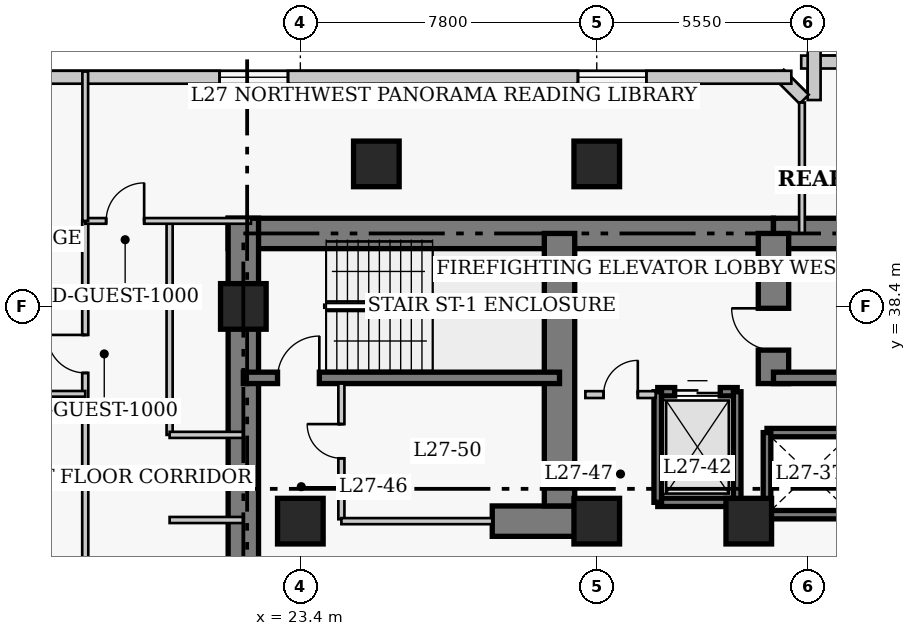
"""IFC4 building model, lengths in metres.
Left out: names, types, materials, properties, quantities, classifications, styles, units other than length and angle.
Written with IfcOpenShell. Run it as: python <this file> out.ifc"""

import sys

from ifc_helpers import new_model, si_unit, direction, frame, frame_2d, origin, origin_2d, place, context, subcontext, project, spatial, rectangle, extrude, element, fill, save


model = new_model("IFC4")
c1 = context("Model", 3, precision=1e-05, world=origin(), true_north=direction((0.0, 1.0)))
c2 = subcontext(c1, "Body", "Model", "MODEL_VIEW")
j1 = project(units=[si_unit("LENGTHUNIT", "METRE"), si_unit("PLANEANGLEUNIT", "RADIAN")], contexts=[c1])
p1 = place(None, origin())
s1 = spatial("IfcSite", under=j1, at=p1, CompositionType="ELEMENT")
p2 = place(p1, origin())
s2 = spatial("IfcBuilding", under=s1, at=p2, CompositionType="ELEMENT")
p3 = place(p2, frame((0.0, 0.0, 110.8)))
s3 = spatial("IfcBuildingStorey", under=s2, at=p3, CompositionType="ELEMENT", Elevation=110.8)
p4 = place(p3, frame((21.5, 40.32, 0.0), z_axis=(0.0, 0.0, 1.0), x_axis=(1.0, 0.0, 0.0)))
e1 = element("IfcWall", 1, at=p4, inside=s3, PredefinedType="SHEAR", context=c2, shape_type="SweptSolid", body=[
    extrude(rectangle(XDim=14.35, YDim=0.8, at=frame_2d((7.175, 0.0))), origin(), (0.0, 0.0, 1.0), 3.8),
])
p5 = place(p3, frame((35.85, 40.32, 0.0), z_axis=(0.0, 0.0, 1.0), x_axis=(1.0, 0.0, 0.0)))
e2 = element("IfcWall", 2, at=p5, inside=s3, PredefinedType="SHEAR", context=c2, shape_type="SweptSolid", body=[
    extrude(rectangle(XDim=12.6, YDim=0.8, at=frame_2d((6.3, 0.0))), origin(), (0.0, 0.0, 1.0), 3.8),
])
p6 = place(p3, frame((21.9, 27.05, 0.0), z_axis=(0.0, 0.0, 1.0), x_axis=(0.0, 1.0, 0.0)))
e3 = element("IfcWall", 3, at=p6, inside=s3, PredefinedType="SHEAR", context=c2, shape_type="SweptSolid", body=[
    extrude(rectangle(XDim=13.67, YDim=0.8, at=frame_2d((6.835, 0.0))), origin(), (0.0, 0.0, 1.0), 3.8),
])
p7 = place(p3, frame((28.45, 32.75, 0.0), z_axis=(0.0, 0.0, 1.0), x_axis=(1.0, 0.0, 0.0)))
e4 = element("IfcWall", 4, at=p7, inside=s3, PredefinedType="SHEAR", context=c2, shape_type="SweptSolid", body=[
    extrude(rectangle(XDim=2.4, YDim=0.8, at=frame_2d((1.2, 0.0))), origin(), (0.0, 0.0, 1.0), 3.8),
])
p8 = place(p3, frame((30.22, 33.15, 0.0), z_axis=(0.0, 0.0, 1.0), x_axis=(0.0, 1.0, 0.0)))
e5 = element("IfcWall", 5, at=p8, inside=s3, PredefinedType="SHEAR", context=c2, shape_type="SweptSolid", body=[
    extrude(rectangle(XDim=7.17, YDim=0.8, at=frame_2d((3.585, 0.0))), origin(), (0.0, 0.0, 1.0), 3.8),
])
p9 = place(p3, frame((35.85, 36.37, 0.0), z_axis=(0.0, 0.0, 1.0), x_axis=(0.0, 1.0, 0.0)))
e6 = element("IfcWall", 6, at=p9, inside=s3, PredefinedType="SHEAR", context=c2, shape_type="SweptSolid", body=[
    extrude(rectangle(XDim=3.95, YDim=0.8, at=frame_2d((1.975, 0.0))), origin(), (0.0, 0.0, 1.0), 3.8),
])
p10 = place(p9, frame((0.88, 0.0, 0.0)))
e7 = element("IfcOpeningElement", 7, at=p10, cuts=e6, PredefinedType="OPENING", context=c2, shape_type="SweptSolid", body=[
    extrude(rectangle(XDim=1.1, YDim=2.15, at=frame_2d((0.55, 1.075))), frame((0.0, 0.41, 0.0), z_axis=(0.0, -1.0, 0.0), x_axis=(1.0, 0.0, 0.0)), (0.0, 0.0, 1.0), 0.82),
])
p11 = place(p3, frame((21.9, 36.52, 0.0), z_axis=(0.0, 0.0, 1.0), x_axis=(1.0, 0.0, 0.0)))
e8 = element("IfcWall", 8, at=p11, inside=s3, PredefinedType="SHEAR", context=c2, shape_type="SweptSolid", body=[
    extrude(rectangle(XDim=8.32, YDim=0.3, at=frame_2d((4.16, 0.0))), origin(), (0.0, 0.0, 1.0), 3.8),
])
p12 = place(p11, frame((0.9, 0.0, 0.0)))
e9 = element("IfcOpeningElement", 9, at=p12, cuts=e8, PredefinedType="OPENING", context=c2, shape_type="SweptSolid", body=[
    extrude(rectangle(XDim=1.1, YDim=2.15, at=frame_2d((0.55, 1.075))), frame((0.0, 0.16, 0.0), z_axis=(0.0, -1.0, 0.0), x_axis=(1.0, 0.0, 0.0)), (0.0, 0.0, 1.0), 0.32),
])
p13 = place(p3, frame((35.85, 36.52, 0.0), z_axis=(0.0, 0.0, 1.0), x_axis=(1.0, 0.0, 0.0)))
e10 = element("IfcWall", 10, at=p13, inside=s3, PredefinedType="SHEAR", context=c2, shape_type="SweptSolid", body=[
    extrude(rectangle(XDim=8.33, YDim=0.3, at=frame_2d((4.165, 0.0))), origin(), (0.0, 0.0, 1.0), 3.8),
])
for number, where, z_axis, x_axis in (
    (11, (21.9, 38.4, 0.0), (0.0, 0.0, 1.0), (1.0, 0.0, 0.0)),
    (12, (23.4, 32.75, 0.0), (0.0, 0.0, 1.0), (1.0, 0.0, 0.0)),
    (13, (31.2, 32.75, 0.0), (0.0, 0.0, 1.0), (1.0, 0.0, 0.0)),
    (14, (35.2, 32.75, 0.0), (0.0, 0.0, 1.0), (1.0, 0.0, 0.0)),
    (15, (25.4, 42.15, 0.0), (0.0, 0.0, 1.0), (1.0, 0.0, 0.0)),
    (16, (31.2, 42.15, 0.0), (0.0, 0.0, 1.0), (1.0, 0.0, 0.0)),
):
    element("IfcColumn", number, at=place(p3, frame(where, z_axis=z_axis, x_axis=x_axis)), inside=s3, PredefinedType="COLUMN", context=c2, shape_type="SweptSolid", body=[
        extrude(rectangle(XDim=1.2, YDim=1.2, at=origin_2d()), origin(), (0.0, 0.0, 1.0), 3.8),
    ])
p14 = place(p3, frame((41.42, 44.83, 0.0), z_axis=(0.0, 0.0, 1.0), x_axis=(-1.0, 0.0, 0.0)))
e17 = element("IfcWall", 17, at=p14, inside=s3, PredefinedType="SOLIDWALL", context=c2, shape_type="SweptSolid", body=[
    extrude(rectangle(XDim=4.84, YDim=0.34, at=frame_2d((2.42, 0.0))), origin(), (0.0, 0.0, 1.0), 3.54),
])
p15 = place(p14, frame((1.52, 0.0, 0.85)))
e18 = element("IfcOpeningElement", 18, at=p15, cuts=e17, PredefinedType="OPENING", context=c2, shape_type="SweptSolid", body=[
    extrude(rectangle(XDim=1.8, YDim=1.8, at=frame_2d((0.9, 0.9))), frame((0.0, 0.18, 0.0), z_axis=(0.0, -1.0, 0.0), x_axis=(1.0, 0.0, 0.0)), (0.0, 0.0, 1.0), 0.36),
])
p16 = place(p3, frame((36.92, 45.17, 0.0), z_axis=(0.0, 0.0, 1.0), x_axis=(0.0, -1.0, 0.0)))
e19 = element("IfcWall", 19, at=p16, inside=s3, PredefinedType="SOLIDWALL", context=c2, shape_type="SweptSolid", body=[
    extrude(rectangle(XDim=1.34, YDim=0.34, at=frame_2d((0.67, 0.0))), origin(), (0.0, 0.0, 1.0), 3.54),
])
p17 = place(p3, frame((36.658, 43.852, 0.0), z_axis=(0.0, 0.0, 1.0), x_axis=(-0.707238225886, 0.706975312048, 0.0)))
e20 = element("IfcWall", 20, at=p17, inside=s3, PredefinedType="SOLIDWALL", context=c2, shape_type="SweptSolid", body=[
    extrude(rectangle(XDim=0.929, YDim=0.34, at=frame_2d((0.464, 0.0))), origin(), (0.0, 0.0, 1.0), 3.54),
])
p18 = place(p3, frame((36.32, 44.43, 0.0), z_axis=(0.0, 0.0, 1.0), x_axis=(-1.0, 0.0, 0.0)))
e21 = element("IfcWall", 21, at=p18, inside=s3, PredefinedType="SOLIDWALL", context=c2, shape_type="SweptSolid", body=[
    extrude(rectangle(XDim=28.29, YDim=0.34, at=frame_2d((14.145, 0.0))), origin(), (0.0, 0.0, 1.0), 3.54),
])
p19 = place(p18, frame((3.815, 0.0, 0.85)))
e22 = element("IfcOpeningElement", 22, at=p19, cuts=e21, PredefinedType="OPENING", context=c2, shape_type="SweptSolid", body=[
    extrude(rectangle(XDim=1.8, YDim=1.8, at=frame_2d((0.9, 0.9))), frame((0.0, 0.18, 0.0), z_axis=(0.0, -1.0, 0.0), x_axis=(1.0, 0.0, 0.0)), (0.0, 0.0, 1.0), 0.36),
])
p20 = place(p18, frame((13.245, 0.0, 0.85)))
e23 = element("IfcOpeningElement", 23, at=p20, cuts=e21, PredefinedType="OPENING", context=c2, shape_type="SweptSolid", body=[
    extrude(rectangle(XDim=1.8, YDim=1.8, at=frame_2d((0.9, 0.9))), frame((0.0, 0.18, 0.0), z_axis=(0.0, -1.0, 0.0), x_axis=(1.0, 0.0, 0.0)), (0.0, 0.0, 1.0), 0.36),
])
p21 = place(p18, frame((22.675, 0.0, 0.85)))
e24 = element("IfcOpeningElement", 24, at=p21, cuts=e21, PredefinedType="OPENING", context=c2, shape_type="SweptSolid", body=[
    extrude(rectangle(XDim=1.8, YDim=1.8, at=frame_2d((0.9, 0.9))), frame((0.0, 0.18, 0.0), z_axis=(0.0, -1.0, 0.0), x_axis=(1.0, 0.0, 0.0)), (0.0, 0.0, 1.0), 0.36),
])
for number, where, z_axis, x_axis in (
    (25, (35.68, 35.08, 0.0), (0.0, 0.0, 1.0), (1.0, 0.0, 0.0)),
    (26, (35.68, 32.92, 0.0), (0.0, 0.0, 1.0), (1.0, 0.0, 0.0)),
):
    element("IfcWall", number, at=place(p3, frame(where, z_axis=z_axis, x_axis=x_axis)), inside=s3, PredefinedType="SHEAR", context=c2, shape_type="SweptSolid", body=[
        extrude(rectangle(XDim=2.32, YDim=0.22, at=frame_2d((1.16, 0.0))), origin(), (0.0, 0.0, 1.0), 3.8),
    ])
p22 = place(p3, frame((35.68, 32.92, 0.0), z_axis=(0.0, 0.0, 1.0), x_axis=(0.0, 1.0, 0.0)))
e27 = element("IfcWall", 27, at=p22, inside=s3, PredefinedType="SHEAR", context=c2, shape_type="SweptSolid", body=[
    extrude(rectangle(XDim=2.16, YDim=0.2, at=frame_2d((1.08, 0.0))), origin(), (0.0, 0.0, 1.0), 3.8),
])
p23 = place(p3, frame((32.805, 36.155, 0.0), z_axis=(0.0, 0.0, 1.0), x_axis=(1.0, 0.0, 0.0)))
e28 = element("IfcWall", 28, at=p23, inside=s3, PredefinedType="SHEAR", context=c2, shape_type="SweptSolid", body=[
    extrude(rectangle(XDim=2.09, YDim=0.22, at=frame_2d((1.045, 0.0))), origin(), (0.0, 0.0, 1.0), 3.8),
])
p24 = place(p23, frame((0.445, 0.0, 0.0)))
e29 = element("IfcOpeningElement", 29, at=p24, cuts=e28, PredefinedType="OPENING", context=c2, shape_type="SweptSolid", body=[
    extrude(rectangle(XDim=1.2, YDim=2.15, at=frame_2d((0.6, 1.075))), frame((0.0, 0.12, 0.0), z_axis=(0.0, -1.0, 0.0), x_axis=(1.0, 0.0, 0.0)), (0.0, 0.0, 1.0), 0.24),
])
p25 = place(p3, frame((32.805, 33.245, 0.0), z_axis=(0.0, 0.0, 1.0), x_axis=(1.0, 0.0, 0.0)))
e30 = element("IfcWall", 30, at=p25, inside=s3, PredefinedType="SHEAR", context=c2, shape_type="SweptSolid", body=[
    extrude(rectangle(XDim=2.09, YDim=0.22, at=frame_2d((1.045, 0.0))), origin(), (0.0, 0.0, 1.0), 3.8),
])
for number, where, z_axis, x_axis in (
    (31, (32.805, 33.245, 0.0), (0.0, 0.0, 1.0), (0.0, 1.0, 0.0)),
    (32, (34.895, 33.245, 0.0), (0.0, 0.0, 1.0), (0.0, 1.0, 0.0)),
):
    element("IfcWall", number, at=place(p3, frame(where, z_axis=z_axis, x_axis=x_axis)), inside=s3, PredefinedType="SHEAR", context=c2, shape_type="SweptSolid", body=[
        extrude(rectangle(XDim=2.91, YDim=0.2, at=frame_2d((1.455, 0.0))), origin(), (0.0, 0.0, 1.0), 3.8),
    ])
p26 = place(p3, frame((30.9, 36.08, 0.0), z_axis=(0.0, 0.0, 1.0), x_axis=(1.0, 0.0, 0.0)))
e33 = element("IfcWall", 33, at=p26, inside=s3, PredefinedType="PARTITIONING", context=c2, shape_type="SweptSolid", body=[
    extrude(rectangle(XDim=1.85, YDim=0.18, at=frame_2d((0.925, 0.0))), origin(), (0.0, 0.0, 1.0), 3.54),
])
p27 = place(p26, frame((0.48, 0.0, 0.0)))
e34 = element("IfcOpeningElement", 34, at=p27, cuts=e33, PredefinedType="OPENING", context=c2, shape_type="SweptSolid", body=[
    extrude(rectangle(XDim=0.9, YDim=2.15, at=frame_2d((0.45, 1.075))), frame((0.0, 0.1, 0.0), z_axis=(0.0, -1.0, 0.0), x_axis=(1.0, 0.0, 0.0)), (0.0, 0.0, 1.0), 0.2),
])
p28 = place(p3, frame((24.48, 32.8, 0.0), z_axis=(0.0, 0.0, 1.0), x_axis=(0.0, 1.0, 0.0)))
e35 = element("IfcWall", 35, at=p28, inside=s3, PredefinedType="PARTITIONING", context=c2, shape_type="SweptSolid", body=[
    extrude(rectangle(XDim=3.57, YDim=0.16, at=frame_2d((1.785, 0.0))), origin(), (0.0, 0.0, 1.0), 3.54),
])
p29 = place(p28, frame((1.604, 0.0, 0.0)))
e36 = element("IfcOpeningElement", 36, at=p29, cuts=e35, PredefinedType="OPENING", context=c2, shape_type="SweptSolid", body=[
    extrude(rectangle(XDim=0.9, YDim=2.1, at=frame_2d((0.45, 1.05))), frame((0.0, 0.09, 0.0), z_axis=(0.0, -1.0, 0.0), x_axis=(1.0, 0.0, 0.0)), (0.0, 0.0, 1.0), 0.18),
])
p30 = place(p3, frame((24.48, 32.75, 0.0), z_axis=(0.0, 0.0, 1.0), x_axis=(1.0, 0.0, 0.0)))
e37 = element("IfcWall", 37, at=p30, inside=s3, PredefinedType="PARTITIONING", context=c2, shape_type="SweptSolid", body=[
    extrude(rectangle(XDim=3.97, YDim=0.16, at=frame_2d((1.985, 0.0))), origin(), (0.0, 0.0, 1.0), 3.54),
])
p31 = place(p3, frame((17.74, 6.65, 0.0), z_axis=(0.0, 0.0, 1.0), x_axis=(0.0, 1.0, 0.0)))
e38 = element("IfcWall", 38, at=p31, inside=s3, PredefinedType="PARTITIONING", context=c2, shape_type="SweptSolid", body=[
    extrude(rectangle(XDim=34.0, YDim=0.16, at=frame_2d((17.0, 0.0))), origin(), (0.0, 0.0, 1.0), 3.54),
])
p32 = place(p31, frame((1.8, 0.0, 0.0)))
e39 = element("IfcOpeningElement", 39, at=p32, cuts=e38, PredefinedType="OPENING", context=c2, shape_type="SweptSolid", body=[
    extrude(rectangle(XDim=0.95, YDim=2.1, at=frame_2d((0.475, 1.05))), frame((0.0, 0.09, 0.0), z_axis=(0.0, -1.0, 0.0), x_axis=(1.0, 0.0, 0.0)), (0.0, 0.0, 1.0), 0.18),
])
p33 = place(p31, frame((8.475, 0.0, 0.0)))
e40 = element("IfcOpeningElement", 40, at=p33, cuts=e38, PredefinedType="OPENING", context=c2, shape_type="SweptSolid", body=[
    extrude(rectangle(XDim=0.95, YDim=2.1, at=frame_2d((0.475, 1.05))), frame((0.0, 0.09, 0.0), z_axis=(0.0, -1.0, 0.0), x_axis=(1.0, 0.0, 0.0)), (0.0, 0.0, 1.0), 0.18),
])
p34 = place(p31, frame((14.255, 0.0, 0.0)))
e41 = element("IfcOpeningElement", 41, at=p34, cuts=e38, PredefinedType="OPENING", context=c2, shape_type="SweptSolid", body=[
    extrude(rectangle(XDim=0.95, YDim=2.1, at=frame_2d((0.475, 1.05))), frame((0.0, 0.09, 0.0), z_axis=(0.0, -1.0, 0.0), x_axis=(1.0, 0.0, 0.0)), (0.0, 0.0, 1.0), 0.18),
])
p35 = place(p31, frame((30.0, 0.0, 0.0)))
e42 = element("IfcOpeningElement", 42, at=p35, cuts=e38, PredefinedType="OPENING", context=c2, shape_type="SweptSolid", body=[
    extrude(rectangle(XDim=1.0, YDim=2.15, at=frame_2d((0.5, 1.075))), frame((0.0, 0.09, 0.0), z_axis=(0.0, -1.0, 0.0), x_axis=(1.0, 0.0, 0.0)), (0.0, 0.0, 1.0), 0.18),
])
p36 = place(p3, frame((19.96, 35.02, 0.0), z_axis=(0.0, 0.0, 1.0), x_axis=(0.0, 1.0, 0.0)))
e43 = element("IfcWall", 43, at=p36, inside=s3, PredefinedType="PARTITIONING", context=c2, shape_type="SweptSolid", body=[
    extrude(rectangle(XDim=5.63, YDim=0.16, at=frame_2d((2.815, 0.0))), origin(), (0.0, 0.0, 1.0), 3.54),
])
for number, where, z_axis, x_axis in (
    (44, (19.96, 35.02, 0.0), (0.0, 0.0, 1.0), (1.0, 0.0, 0.0)),
    (45, (19.96, 32.78, 0.0), (0.0, 0.0, 1.0), (1.0, 0.0, 0.0)),
):
    element("IfcWall", number, at=place(p3, frame(where, z_axis=z_axis, x_axis=x_axis)), inside=s3, PredefinedType="PARTITIONING", context=c2, shape_type="SweptSolid", body=[
        extrude(rectangle(XDim=1.94, YDim=0.16, at=frame_2d((0.97, 0.0))), origin(), (0.0, 0.0, 1.0), 3.54),
    ])
p37 = place(p3, frame((17.74, 40.65, 0.0), z_axis=(0.0, 0.0, 1.0), x_axis=(1.0, 0.0, 0.0)))
e46 = element("IfcWall", 46, at=p37, inside=s3, PredefinedType="PARTITIONING", context=c2, shape_type="SweptSolid", body=[
    extrude(rectangle(XDim=4.36, YDim=0.15, at=frame_2d((2.18, 0.0))), origin(), (0.0, 0.0, 1.0), 3.54),
])
p38 = place(p37, frame((0.55, 0.0, 0.0)))
e47 = element("IfcOpeningElement", 47, at=p38, cuts=e46, PredefinedType="OPENING", context=c2, shape_type="SweptSolid", body=[
    extrude(rectangle(XDim=1.0, YDim=2.15, at=frame_2d((0.5, 1.075))), frame((0.0, 0.085, 0.0), z_axis=(0.0, -1.0, 0.0), x_axis=(1.0, 0.0, 0.0)), (0.0, 0.0, 1.0), 0.17),
])
p39 = place(p3, frame((17.74, 40.65, 0.0), z_axis=(0.0, 0.0, 1.0), x_axis=(0.0, 1.0, 0.0)))
e48 = element("IfcWall", 48, at=p39, inside=s3, PredefinedType="PARTITIONING", context=c2, shape_type="SweptSolid", body=[
    extrude(rectangle(XDim=3.93, YDim=0.15, at=frame_2d((1.965, 0.0))), origin(), (0.0, 0.0, 1.0), 3.54),
])
p40 = place(p3, frame((36.6, 40.32, 0.0), z_axis=(0.0, 0.0, 1.0), x_axis=(0.0, 1.0, 0.0)))
e49 = element("IfcWall", 49, at=p40, inside=s3, PredefinedType="PARTITIONING", context=c2, shape_type="SweptSolid", body=[
    extrude(rectangle(XDim=3.445, YDim=0.15, at=frame_2d((1.723, 0.0))), origin(), (0.0, 0.0, 1.0), 3.54),
])
p41 = place(p3, frame((14.45, 36.1, 0.0), z_axis=(0.0, 0.0, 1.0), x_axis=(1.0, 0.0, 0.0)))
e50 = element("IfcWall", 50, at=p41, inside=s3, PredefinedType="PARTITIONING", context=c2, shape_type="SweptSolid", body=[
    extrude(rectangle(XDim=3.29, YDim=0.15, at=frame_2d((1.645, 0.0))), origin(), (0.0, 0.0, 1.0), 3.54),
])
p42 = place(p19, origin())
e51 = element("IfcWindow", 51, at=p42, inside=s3, PartitioningType="SINGLE_PANEL", PredefinedType="WINDOW", context=c2, shape_type="SweptSolid", body=[
    extrude(rectangle(XDim=1.8, YDim=1.8, at=frame_2d((0.9, 0.9))), frame((0.0, 0.03, 0.0), z_axis=(0.0, -1.0, 0.0), x_axis=(1.0, 0.0, 0.0)), (0.0, 0.0, 1.0), 0.06),
])
fill(e22, e51)
p43 = place(p20, origin())
e52 = element("IfcWindow", 52, at=p43, inside=s3, PartitioningType="SINGLE_PANEL", PredefinedType="WINDOW", context=c2, shape_type="SweptSolid", body=[
    extrude(rectangle(XDim=1.8, YDim=1.8, at=frame_2d((0.9, 0.9))), frame((0.0, 0.03, 0.0), z_axis=(0.0, -1.0, 0.0), x_axis=(1.0, 0.0, 0.0)), (0.0, 0.0, 1.0), 0.06),
])
fill(e23, e52)
p44 = place(p24, origin())
e53 = element("IfcDoor", 53, at=p44, inside=s3, OperationType="DOUBLE_DOOR_SLIDING", PredefinedType="DOOR", context=c2, shape_type="SweptSolid", body=[
    extrude(rectangle(XDim=1.2, YDim=2.15, at=frame_2d((0.6, 1.075))), frame((0.0, 0.025, 0.0), z_axis=(0.0, -1.0, 0.0), x_axis=(1.0, 0.0, 0.0)), (0.0, 0.0, 1.0), 0.05),
])
fill(e29, e53)
p45 = place(p27, origin())
e54 = element("IfcDoor", 54, at=p45, inside=s3, OperationType="SINGLE_SWING_RIGHT", PredefinedType="DOOR", context=c2, shape_type="SweptSolid", body=[
    extrude(rectangle(XDim=0.9, YDim=2.15, at=frame_2d((0.45, 1.075))), frame((0.0, 0.025, 0.0), z_axis=(0.0, -1.0, 0.0), x_axis=(1.0, 0.0, 0.0)), (0.0, 0.0, 1.0), 0.05),
])
fill(e34, e54)
p46 = place(p29, origin())
e55 = element("IfcDoor", 55, at=p46, inside=s3, OperationType="SINGLE_SWING_RIGHT", PredefinedType="DOOR", context=c2, shape_type="SweptSolid", body=[
    extrude(rectangle(XDim=0.9, YDim=2.1, at=frame_2d((0.45, 1.05))), frame((0.0, 0.025, 0.0), z_axis=(0.0, -1.0, 0.0), x_axis=(1.0, 0.0, 0.0)), (0.0, 0.0, 1.0), 0.05),
])
fill(e36, e55)
p47 = place(p38, origin())
e56 = element("IfcDoor", 56, at=p47, inside=s3, OperationType="SINGLE_SWING_RIGHT", PredefinedType="DOOR", context=c2, shape_type="SweptSolid", body=[
    extrude(rectangle(XDim=1.0, YDim=2.15, at=frame_2d((0.5, 1.075))), frame((0.0, 0.025, 0.0), z_axis=(0.0, -1.0, 0.0), x_axis=(1.0, 0.0, 0.0)), (0.0, 0.0, 1.0), 0.05),
])
fill(e47, e56)
p48 = place(p35, origin())
e57 = element("IfcDoor", 57, at=p48, inside=s3, OperationType="SINGLE_SWING_RIGHT", PredefinedType="DOOR", context=c2, shape_type="SweptSolid", body=[
    extrude(rectangle(XDim=1.0, YDim=2.15, at=frame_2d((0.5, 1.075))), frame((0.0, 0.025, 0.0), z_axis=(0.0, -1.0, 0.0), x_axis=(1.0, 0.0, 0.0)), (0.0, 0.0, 1.0), 0.05),
])
fill(e42, e57)
p49 = place(p12, origin())
e58 = element("IfcDoor", 58, at=p49, inside=s3, OperationType="SINGLE_SWING_RIGHT", PredefinedType="DOOR", context=c2, shape_type="SweptSolid", body=[
    extrude(rectangle(XDim=1.1, YDim=2.15, at=frame_2d((0.55, 1.075))), frame((0.0, 0.025, 0.0), z_axis=(0.0, -1.0, 0.0), x_axis=(1.0, 0.0, 0.0)), (0.0, 0.0, 1.0), 0.05),
])
fill(e9, e58)
p50 = place(p10, origin())
e59 = element("IfcDoor", 59, at=p50, inside=s3, OperationType="SINGLE_SWING_RIGHT", PredefinedType="DOOR", context=c2, shape_type="SweptSolid", body=[
    extrude(rectangle(XDim=1.1, YDim=2.15, at=frame_2d((0.55, 1.075))), frame((0.0, 0.025, 0.0), z_axis=(0.0, -1.0, 0.0), x_axis=(1.0, 0.0, 0.0)), (0.0, 0.0, 1.0), 0.05),
])
fill(e7, e59)
save(model, sys.argv[1])
